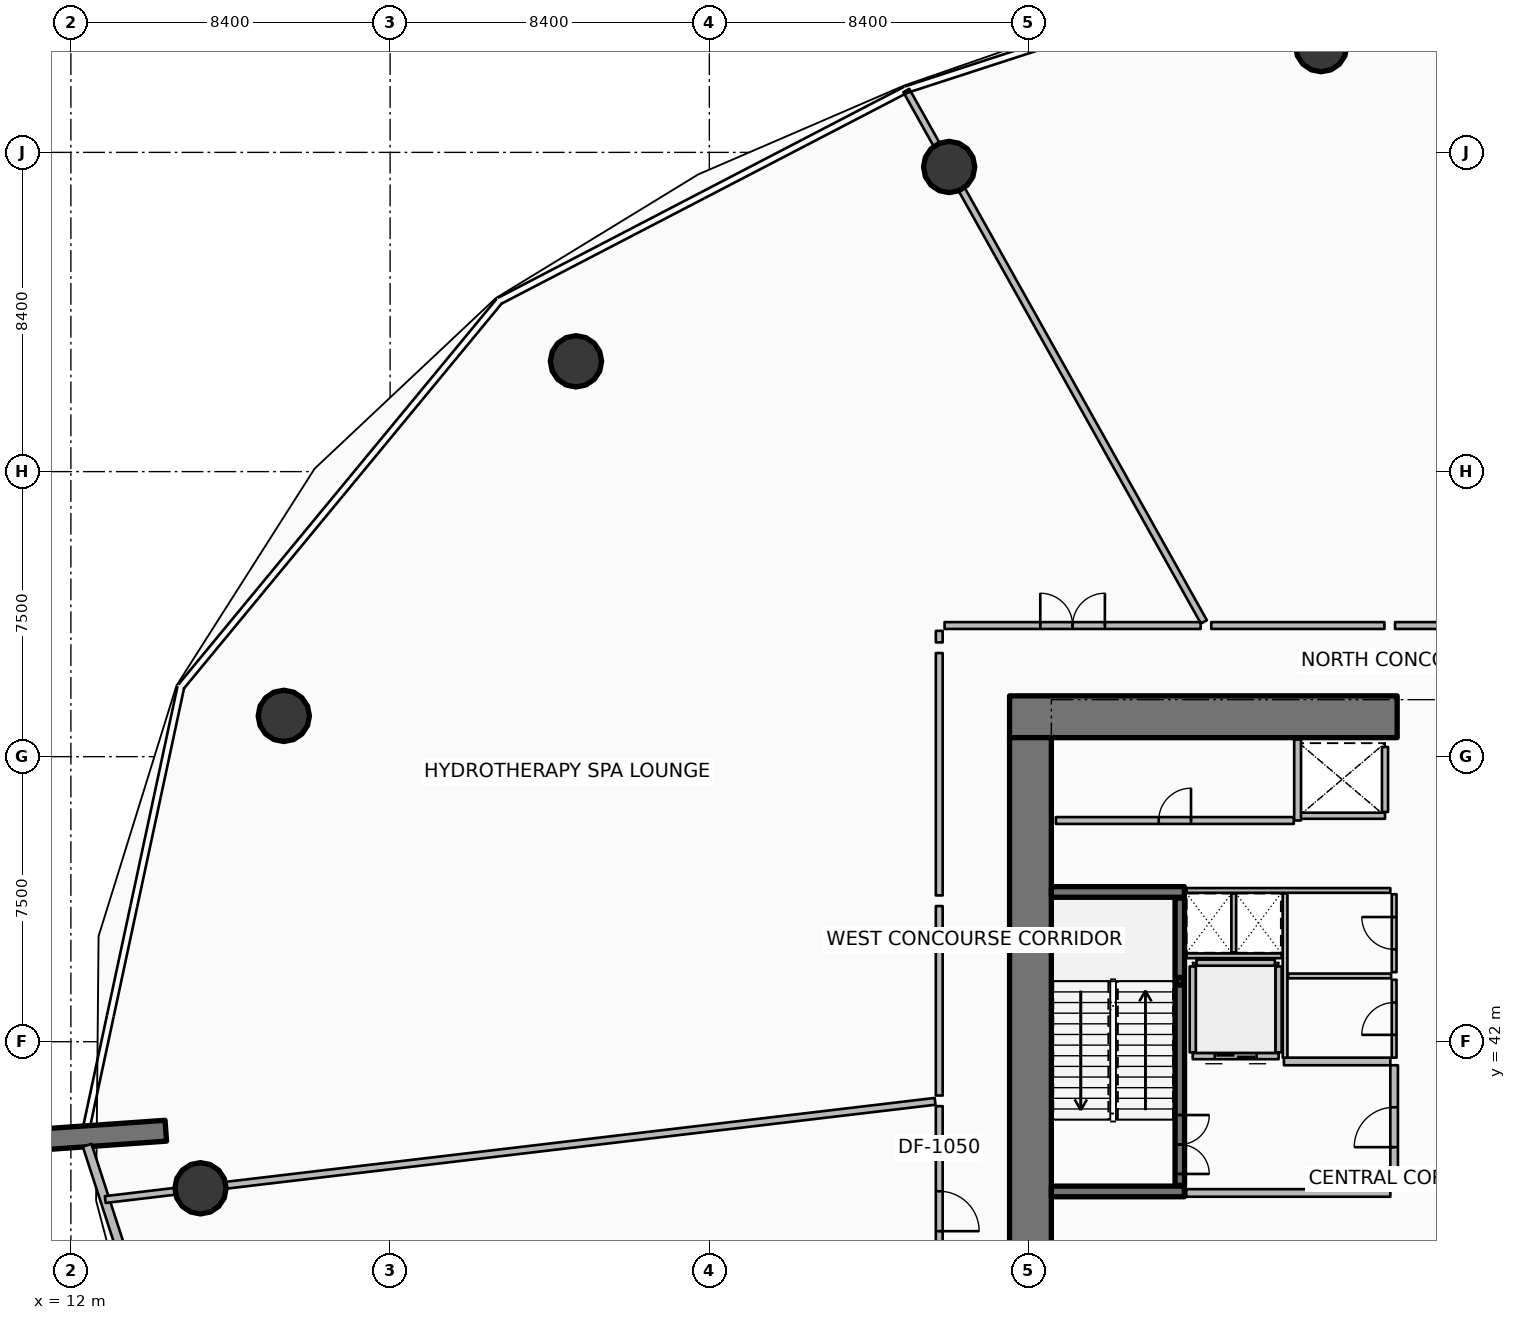
"""IFC4 building model, lengths in metres.
Left out: names, types, materials, properties, quantities, classifications, styles, units other than length and angle.
Written with IfcOpenShell. Run it as: python <this file> out.ifc"""

import sys

from ifc_helpers import new_model, si_unit, direction, frame, frame_2d, origin, origin_2d, place, context, subcontext, project, spatial, rectangle, hollow_rectangle, circle, extrude, element, fill, save


model = new_model("IFC4")
c1 = context("Model", 3, precision=1e-05, world=origin(), true_north=direction((0.0, 1.0)))
c2 = subcontext(c1, "Body", "Model", "MODEL_VIEW")
j1 = project(units=[si_unit("LENGTHUNIT", "METRE"), si_unit("PLANEANGLEUNIT", "RADIAN")], contexts=[c1])
p1 = place(None, origin())
s1 = spatial("IfcSite", under=j1, at=p1, CompositionType="ELEMENT")
p2 = place(p1, origin())
s2 = spatial("IfcBuilding", under=s1, at=p2, CompositionType="ELEMENT")
p3 = place(p2, frame((0.0, 0.0, 12.0)))
s3 = spatial("IfcBuildingStorey", under=s2, at=p3, CompositionType="ELEMENT", Elevation=12.0)
p4 = place(p3, frame((36.7, 50.55, 0.0), z_axis=(0.0, 0.0, 1.0), x_axis=(1.0, 0.0, 0.0)))
e1 = element("IfcWall", 1, at=p4, inside=s3, PredefinedType="SHEAR", context=c2, shape_type="SweptSolid", body=[
    extrude(rectangle(XDim=10.2, YDim=1.1, at=frame_2d((5.1, 0.0))), origin(), (0.0, 0.0, 1.0), 4.8),
])
p5 = place(p3, frame((37.25, 34.0, 0.0), z_axis=(0.0, 0.0, 1.0), x_axis=(0.0, 1.0, 0.0)))
e2 = element("IfcWall", 2, at=p5, inside=s3, PredefinedType="SHEAR", context=c2, shape_type="SweptSolid", body=[
    extrude(rectangle(XDim=16.0, YDim=1.1, at=frame_2d((8.0, 0.0))), origin(), (0.0, 0.0, 1.0), 4.8),
])
for number, where, z_axis, x_axis in (
    (3, (37.8, 38.06, 0.0), (0.0, 0.0, 1.0), (1.0, 0.0, 0.0)),
    (4, (37.8, 45.94, 0.0), (0.0, 0.0, 1.0), (1.0, 0.0, 0.0)),
):
    element("IfcWall", number, at=place(p3, frame(where, z_axis=z_axis, x_axis=x_axis)), inside=s3, PredefinedType="SHEAR", context=c2, shape_type="SweptSolid", body=[
        extrude(rectangle(XDim=3.5, YDim=0.28, at=frame_2d((1.75, 0.0))), origin(), (0.0, 0.0, 1.0), 4.8),
    ])
p6 = place(p3, frame((41.18, 43.59, 0.0), z_axis=(0.0, 0.0, 1.0), x_axis=(1.0, 0.0, 0.0)))
e5 = element("IfcColumn", 5, at=p6, inside=s3, PredefinedType="COLUMN", context=c2, shape_type="SweptSolid", body=[
    extrude(hollow_rectangle(XDim=0.2, YDim=0.2, WallThickness=0.01, InnerFilletRadius=0.01, OuterFilletRadius=0.02, at=origin_2d()), origin(), (0.0, 0.0, 1.0), 2.195),
])
p7 = place(p3, frame((14.497, 39.657, 0.0), z_axis=(0.0, 0.0, 1.0), x_axis=(-0.997564163539, -0.069754853754, 0.0)))
e6 = element("IfcWall", 6, at=p7, inside=s3, PredefinedType="SOLIDWALL", context=c2, shape_type="SweptSolid", body=[
    extrude(rectangle(XDim=3.5, YDim=0.55, at=frame_2d((1.75, 0.0))), origin(), (0.0, 0.0, 1.0), 4.8),
])
for number, where, z_axis, x_axis in (
    (7, (44.899, 68.196, 0.0), (0.0, 0.0, 1.0), (1.0, 0.0, 0.0)),
    (8, (35.111, 65.016, 0.0), (0.0, 0.0, 1.0), (1.0, 0.0, 0.0)),
    (9, (25.291, 59.902, 0.0), (0.0, 0.0, 1.0), (1.0, 0.0, 0.0)),
    (10, (17.602, 50.573, 0.0), (0.0, 0.0, 1.0), (1.0, 0.0, 0.0)),
    (11, (15.41, 38.143, 0.0), (0.0, 0.0, 1.0), (1.0, 0.0, 0.0)),
):
    element("IfcColumn", number, at=place(p3, frame(where, z_axis=z_axis, x_axis=x_axis)), inside=s3, PredefinedType="COLUMN", context=c2, shape_type="SweptSolid", body=[
        extrude(circle(Radius=0.675, at=origin_2d()), origin(), (0.0, 0.0, 1.0), 4.48),
    ])
p8 = place(p3, frame((12.427, 39.275, 0.0), z_axis=(0.0, 0.0, 1.0), x_axis=(0.309022005354, -0.951054888115, 0.0)))
e12 = element("IfcWall", 12, at=p8, inside=s3, PredefinedType="SOLIDWALL", context=c2, shape_type="SweptSolid", body=[
    extrude(rectangle(XDim=16.803, YDim=0.24, at=frame_2d((8.401, 0.0))), origin(), (0.0, 0.0, 1.0), 3.43),
])
p9 = place(p8, frame((7.201, 0.0, 0.85)))
e13 = element("IfcOpeningElement", 13, at=p9, cuts=e12, PredefinedType="OPENING", context=c2, shape_type="SweptSolid", body=[
    extrude(rectangle(XDim=2.4, YDim=2.1, at=frame_2d((1.2, 1.05))), frame((0.0, 0.13, 0.0), z_axis=(0.0, -1.0, 0.0), x_axis=(1.0, 0.0, 0.0)), (0.0, 0.0, 1.0), 0.26),
])
p10 = place(p3, frame((41.18, 38.22, 0.0), z_axis=(0.0, 0.0, 1.0), x_axis=(0.0, 1.0, 0.0)))
e14 = element("IfcWall", 14, at=p10, inside=s3, PredefinedType="SOLIDWALL", context=c2, shape_type="SweptSolid", body=[
    extrude(rectangle(XDim=7.56, YDim=0.25, at=frame_2d((3.78, 0.0))), origin(), (0.0, 0.0, 1.0), 4.48),
])
p11 = place(p10, frame((0.3, 0.0, 0.0)))
e15 = element("IfcOpeningElement", 15, at=p11, cuts=e14, PredefinedType="OPENING", context=c2, shape_type="SweptSolid", body=[
    extrude(rectangle(XDim=1.55, YDim=2.15, at=frame_2d((0.775, 1.075))), frame((0.0, 0.135, 0.0), z_axis=(0.0, -1.0, 0.0), x_axis=(1.0, 0.0, 0.0)), (0.0, 0.0, 1.0), 0.27),
])
p12 = place(p3, frame((46.58, 47.945, 0.0), z_axis=(0.0, 0.0, 1.0), x_axis=(-1.0, 0.0, 0.0)))
e16 = element("IfcWall", 16, at=p12, inside=s3, PredefinedType="PARTITIONING", context=c2, shape_type="SweptSolid", body=[
    extrude(rectangle(XDim=2.26, YDim=0.16, at=frame_2d((1.13, 0.0))), origin(), (0.0, 0.0, 1.0), 4.48),
])
p13 = place(p3, frame((46.58, 48.045, 0.0), z_axis=(0.0, 0.0, 1.0), x_axis=(0.0, 1.0, 0.0)))
e17 = element("IfcWall", 17, at=p13, inside=s3, PredefinedType="PARTITIONING", context=c2, shape_type="SweptSolid", body=[
    extrude(rectangle(XDim=1.71, YDim=0.16, at=frame_2d((0.855, 0.0))), origin(), (0.0, 0.0, 1.0), 4.48),
])
p14 = place(p3, frame((43.78, 41.62, 0.0), z_axis=(0.0, 0.0, 1.0), x_axis=(-1.0, 0.0, 0.0)))
e18 = element("IfcWall", 18, at=p14, inside=s3, PredefinedType="PARTITIONING", context=c2, shape_type="SweptSolid", body=[
    extrude(rectangle(XDim=2.26, YDim=0.16, at=frame_2d((1.13, 0.0))), origin(), (0.0, 0.0, 1.0), 4.48),
])
p15 = place(p14, frame((0.58, 0.0, 0.0)))
e19 = element("IfcOpeningElement", 19, at=p15, cuts=e18, PredefinedType="OPENING", context=c2, shape_type="SweptSolid", body=[
    extrude(rectangle(XDim=1.1, YDim=2.1, at=frame_2d((0.55, 1.05))), frame((0.0, 0.09, 0.0), z_axis=(0.0, -1.0, 0.0), x_axis=(1.0, 0.0, 0.0)), (0.0, 0.0, 1.0), 0.18),
])
for number, where, z_axis, x_axis in (
    (20, (43.78, 41.72, 0.0), (0.0, 0.0, 1.0), (0.0, 1.0, 0.0)),
    (21, (41.52, 41.72, 0.0), (0.0, 0.0, 1.0), (0.0, 1.0, 0.0)),
):
    element("IfcWall", number, at=place(p3, frame(where, z_axis=z_axis, x_axis=x_axis)), inside=s3, PredefinedType="PARTITIONING", context=c2, shape_type="SweptSolid", body=[
        extrude(rectangle(XDim=2.26, YDim=0.16, at=frame_2d((1.13, 0.0))), origin(), (0.0, 0.0, 1.0), 4.48),
    ])
p16 = place(p3, frame((41.62, 44.08, 0.0), z_axis=(0.0, 0.0, 1.0), x_axis=(1.0, 0.0, 0.0)))
e22 = element("IfcWall", 22, at=p16, inside=s3, PredefinedType="PARTITIONING", context=c2, shape_type="SweptSolid", body=[
    extrude(rectangle(XDim=2.06, YDim=0.16, at=frame_2d((1.03, 0.0))), origin(), (0.0, 0.0, 1.0), 4.48),
])
p17 = place(p3, frame((37.92, 47.82, 0.0), z_axis=(0.0, 0.0, 1.0), x_axis=(1.0, 0.0, 0.0)))
e23 = element("IfcWall", 23, at=p17, inside=s3, PredefinedType="PARTITIONING", context=c2, shape_type="SweptSolid", body=[
    extrude(rectangle(XDim=6.26, YDim=0.18, at=frame_2d((3.13, 0.0))), origin(), (0.0, 0.0, 1.0), 4.48),
])
p18 = place(p17, frame((2.705, 0.0, 0.0)))
e24 = element("IfcOpeningElement", 24, at=p18, cuts=e23, PredefinedType="OPENING", context=c2, shape_type="SweptSolid", body=[
    extrude(rectangle(XDim=0.85, YDim=2.06, at=frame_2d((0.425, 1.03))), frame((0.0, 0.1, 0.0), z_axis=(0.0, -1.0, 0.0), x_axis=(1.0, 0.0, 0.0)), (0.0, 0.0, 1.0), 0.2),
])
p19 = place(p3, frame((44.28, 47.82, 0.0), z_axis=(0.0, 0.0, 1.0), x_axis=(0.0, 1.0, 0.0)))
e25 = element("IfcWall", 25, at=p19, inside=s3, PredefinedType="PARTITIONING", context=c2, shape_type="SweptSolid", body=[
    extrude(rectangle(XDim=2.13, YDim=0.18, at=frame_2d((1.065, 0.0))), origin(), (0.0, 0.0, 1.0), 4.48),
])
p20 = place(p3, frame((41.35, 38.02, 0.0), z_axis=(0.0, 0.0, 1.0), x_axis=(1.0, 0.0, 0.0)))
e26 = element("IfcWall", 26, at=p20, inside=s3, PredefinedType="PARTITIONING", context=c2, shape_type="SweptSolid", body=[
    extrude(rectangle(XDim=5.37, YDim=0.2, at=frame_2d((2.685, 0.0))), origin(), (0.0, 0.0, 1.0), 4.48),
])
p21 = place(p3, frame((43.92, 41.48, 0.0), z_axis=(0.0, 0.0, 1.0), x_axis=(1.0, 0.0, 0.0)))
e27 = element("IfcWall", 27, at=p21, inside=s3, PredefinedType="PARTITIONING", context=c2, shape_type="SweptSolid", body=[
    extrude(rectangle(XDim=2.8, YDim=0.2, at=frame_2d((1.4, 0.0))), origin(), (0.0, 0.0, 1.0), 4.48),
])
p22 = place(p3, frame((46.82, 38.12, 0.0), z_axis=(0.0, 0.0, 1.0), x_axis=(0.0, 1.0, 0.0)))
e28 = element("IfcWall", 28, at=p22, inside=s3, PredefinedType="PARTITIONING", context=c2, shape_type="SweptSolid", body=[
    extrude(rectangle(XDim=3.26, YDim=0.2, at=frame_2d((1.63, 0.0))), origin(), (0.0, 0.0, 1.0), 4.48),
])
p23 = place(p22, frame((1.105, 0.0, 0.0)))
e29 = element("IfcOpeningElement", 29, at=p23, cuts=e28, PredefinedType="OPENING", context=c2, shape_type="SweptSolid", body=[
    extrude(rectangle(XDim=1.05, YDim=2.1, at=frame_2d((0.525, 1.05))), frame((0.0, 0.11, 0.0), z_axis=(0.0, -1.0, 0.0), x_axis=(1.0, 0.0, 0.0)), (0.0, 0.0, 1.0), 0.22),
])
p24 = place(p3, frame((41.36, 45.98, 0.0), z_axis=(0.0, 0.0, 1.0), x_axis=(1.0, 0.0, 0.0)))
e30 = element("IfcWall", 30, at=p24, inside=s3, PredefinedType="PARTITIONING", context=c2, shape_type="SweptSolid", body=[
    extrude(rectangle(XDim=5.36, YDim=0.125, at=frame_2d((2.68, 0.0))), origin(), (0.0, 0.0, 1.0), 3.92),
])
p25 = place(p3, frame((41.36, 44.26, 0.0), z_axis=(0.0, 0.0, 1.0), x_axis=(1.0, 0.0, 0.0)))
e31 = element("IfcWall", 31, at=p25, inside=s3, PredefinedType="PARTITIONING", context=c2, shape_type="SweptSolid", body=[
    extrude(rectangle(XDim=2.5, YDim=0.125, at=frame_2d((1.25, 0.0))), origin(), (0.0, 0.0, 1.0), 3.92),
])
p26 = place(p3, frame((42.6, 44.35, 0.0), z_axis=(0.0, 0.0, 1.0), x_axis=(0.0, 1.0, 0.0)))
e32 = element("IfcWall", 32, at=p26, inside=s3, PredefinedType="PARTITIONING", context=c2, shape_type="SweptSolid", body=[
    extrude(rectangle(XDim=1.55, YDim=0.125, at=frame_2d((0.775, 0.0))), origin(), (0.0, 0.0, 1.0), 3.92),
])
p27 = place(p3, frame((43.95, 41.58, 0.0), z_axis=(0.0, 0.0, 1.0), x_axis=(0.0, 1.0, 0.0)))
e33 = element("IfcWall", 33, at=p27, inside=s3, PredefinedType="PARTITIONING", context=c2, shape_type="SweptSolid", body=[
    extrude(rectangle(XDim=4.32, YDim=0.125, at=frame_2d((2.16, 0.0))), origin(), (0.0, 0.0, 1.0), 3.92),
])
p28 = place(p3, frame((44.03, 43.73, 0.0), z_axis=(0.0, 0.0, 1.0), x_axis=(1.0, 0.0, 0.0)))
e34 = element("IfcWall", 34, at=p28, inside=s3, PredefinedType="PARTITIONING", context=c2, shape_type="SweptSolid", body=[
    extrude(rectangle(XDim=2.71, YDim=0.125, at=frame_2d((1.355, 0.0))), origin(), (0.0, 0.0, 1.0), 3.92),
])
p29 = place(p3, frame((46.82, 41.58, 0.0), z_axis=(0.0, 0.0, 1.0), x_axis=(0.0, 1.0, 0.0)))
e35 = element("IfcWall", 35, at=p29, inside=s3, PredefinedType="PARTITIONING", context=c2, shape_type="SweptSolid", body=[
    extrude(rectangle(XDim=2.05, YDim=0.125, at=frame_2d((1.025, 0.0))), origin(), (0.0, 0.0, 1.0), 3.92),
])
p30 = place(p29, frame((0.6, 0.0, 0.0)))
e36 = element("IfcOpeningElement", 36, at=p30, cuts=e35, PredefinedType="OPENING", context=c2, shape_type="SweptSolid", body=[
    extrude(rectangle(XDim=0.85, YDim=2.06, at=frame_2d((0.425, 1.03))), frame((0.0, 0.073, 0.0), z_axis=(0.0, -1.0, 0.0), x_axis=(1.0, 0.0, 0.0)), (0.0, 0.0, 1.0), 0.145),
])
p31 = place(p3, frame((46.82, 43.83, 0.0), z_axis=(0.0, 0.0, 1.0), x_axis=(0.0, 1.0, 0.0)))
e37 = element("IfcWall", 37, at=p31, inside=s3, PredefinedType="PARTITIONING", context=c2, shape_type="SweptSolid", body=[
    extrude(rectangle(XDim=2.05, YDim=0.125, at=frame_2d((1.025, 0.0))), origin(), (0.0, 0.0, 1.0), 3.92),
])
p32 = place(p31, frame((0.6, 0.0, 0.0)))
e38 = element("IfcOpeningElement", 38, at=p32, cuts=e37, PredefinedType="OPENING", context=c2, shape_type="SweptSolid", body=[
    extrude(rectangle(XDim=0.85, YDim=2.06, at=frame_2d((0.425, 1.03))), frame((0.0, 0.073, 0.0), z_axis=(0.0, -1.0, 0.0), x_axis=(1.0, 0.0, 0.0)), (0.0, 0.0, 1.0), 0.145),
])
p33 = place(p3, frame((50.948, 52.95, 0.0), z_axis=(0.0, 0.0, 1.0), x_axis=(-1.0, 0.0, 0.0)))
e39 = element("IfcWall", 39, at=p33, inside=s3, PredefinedType="PARTITIONING", context=c2, shape_type="SweptSolid", body=[
    extrude(rectangle(XDim=4.104, YDim=0.18, at=frame_2d((2.052, 0.0))), origin(), (0.0, 0.0, 1.0), 3.693),
])
p34 = place(p3, frame((46.564, 52.95, 0.0), z_axis=(0.0, 0.0, 1.0), x_axis=(-1.0, 0.0, 0.0)))
e40 = element("IfcWall", 40, at=p34, inside=s3, PredefinedType="PARTITIONING", context=c2, shape_type="SweptSolid", body=[
    extrude(rectangle(XDim=4.556, YDim=0.18, at=frame_2d((2.278, 0.0))), origin(), (0.0, 0.0, 1.0), 3.693),
])
p35 = place(p3, frame((41.814, 53.046, 0.0), z_axis=(0.0, 0.0, 1.0), x_axis=(-0.48862053439, 0.872496403071, 0.0)))
e41 = element("IfcWall", 41, at=p35, inside=s3, PredefinedType="PARTITIONING", context=c2, shape_type="SweptSolid", body=[
    extrude(rectangle(XDim=16.024, YDim=0.18, at=frame_2d((8.012, 0.0))), origin(), (0.0, 0.0, 1.0), 3.693),
])
p36 = place(p3, frame((41.728, 52.95, 0.0), z_axis=(0.0, 0.0, 1.0), x_axis=(-1.0, 0.0, 0.0)))
e42 = element("IfcWall", 42, at=p36, inside=s3, PredefinedType="PARTITIONING", context=c2, shape_type="SweptSolid", body=[
    extrude(rectangle(XDim=6.738, YDim=0.18, at=frame_2d((3.369, 0.0))), origin(), (0.0, 0.0, 1.0), 3.693),
])
p37 = place(p36, frame((2.519, 0.0, 0.0)))
e43 = element("IfcOpeningElement", 43, at=p37, cuts=e42, PredefinedType="OPENING", context=c2, shape_type="SweptSolid", body=[
    extrude(rectangle(XDim=1.7, YDim=2.15, at=frame_2d((0.85, 1.075))), frame((0.0, 0.1, 0.0), z_axis=(0.0, -1.0, 0.0), x_axis=(1.0, 0.0, 0.0)), (0.0, 0.0, 1.0), 0.2),
])
p38 = place(p3, frame((34.85, 52.81, 0.0), z_axis=(0.0, 0.0, 1.0), x_axis=(0.0, -1.0, 0.0)))
e44 = element("IfcWall", 44, at=p38, inside=s3, PredefinedType="PARTITIONING", context=c2, shape_type="SweptSolid", body=[
    extrude(rectangle(XDim=0.303, YDim=0.18, at=frame_2d((0.152, 0.0))), origin(), (0.0, 0.0, 1.0), 3.693),
])
p39 = place(p3, frame((34.85, 52.227, 0.0), z_axis=(0.0, 0.0, 1.0), x_axis=(0.0, -1.0, 0.0)))
e45 = element("IfcWall", 45, at=p39, inside=s3, PredefinedType="PARTITIONING", context=c2, shape_type="SweptSolid", body=[
    extrude(rectangle(XDim=6.378, YDim=0.18, at=frame_2d((3.189, 0.0))), origin(), (0.0, 0.0, 1.0), 3.693),
])
p40 = place(p3, frame((34.85, 45.569, 0.0), z_axis=(0.0, 0.0, 1.0), x_axis=(0.0, -1.0, 0.0)))
e46 = element("IfcWall", 46, at=p40, inside=s3, PredefinedType="PARTITIONING", context=c2, shape_type="SweptSolid", body=[
    extrude(rectangle(XDim=4.985, YDim=0.18, at=frame_2d((2.493, 0.0))), origin(), (0.0, 0.0, 1.0), 3.693),
])
p41 = place(p3, frame((34.741, 40.431, 0.0), z_axis=(0.0, 0.0, 1.0), x_axis=(-0.993068662125, -0.117535663975, 0.0)))
e47 = element("IfcWall", 47, at=p41, inside=s3, PredefinedType="PARTITIONING", context=c2, shape_type="SweptSolid", body=[
    extrude(rectangle(XDim=21.989, YDim=0.18, at=frame_2d((10.994, 0.0))), origin(), (0.0, 0.0, 1.0), 3.693),
])
p42 = place(p3, frame((34.85, 40.304, 0.0), z_axis=(0.0, 0.0, 1.0), x_axis=(0.0, -1.0, 0.0)))
e48 = element("IfcWall", 48, at=p42, inside=s3, PredefinedType="PARTITIONING", context=c2, shape_type="SweptSolid", body=[
    extrude(rectangle(XDim=5.528, YDim=0.18, at=frame_2d((2.764, 0.0))), origin(), (0.0, 0.0, 1.0), 3.693),
])
p43 = place(p42, frame((2.239, 0.0, 0.0)))
e49 = element("IfcOpeningElement", 49, at=p43, cuts=e48, PredefinedType="OPENING", context=c2, shape_type="SweptSolid", body=[
    extrude(rectangle(XDim=1.05, YDim=2.1, at=frame_2d((0.525, 1.05))), frame((0.0, 0.1, 0.0), z_axis=(0.0, -1.0, 0.0), x_axis=(1.0, 0.0, 0.0)), (0.0, 0.0, 1.0), 0.2),
])
p44 = place(p11, origin())
e50 = element("IfcDoor", 50, at=p44, inside=s3, OperationType="DOUBLE_DOOR_SINGLE_SWING", PredefinedType="DOOR", context=c2, shape_type="SweptSolid", body=[
    extrude(rectangle(XDim=1.55, YDim=2.15, at=frame_2d((0.775, 1.075))), frame((0.0, 0.025, 0.0), z_axis=(0.0, -1.0, 0.0), x_axis=(1.0, 0.0, 0.0)), (0.0, 0.0, 1.0), 0.05),
])
fill(e15, e50)
p45 = place(p15, origin())
e51 = element("IfcDoor", 51, at=p45, inside=s3, OperationType="DOUBLE_DOOR_SLIDING", PredefinedType="DOOR", context=c2, shape_type="SweptSolid", body=[
    extrude(rectangle(XDim=1.1, YDim=2.1, at=frame_2d((0.55, 1.05))), frame((0.0, 0.025, 0.0), z_axis=(0.0, -1.0, 0.0), x_axis=(1.0, 0.0, 0.0)), (0.0, 0.0, 1.0), 0.05),
])
fill(e19, e51)
p46 = place(p18, origin())
e52 = element("IfcDoor", 52, at=p46, inside=s3, OperationType="SINGLE_SWING_RIGHT", PredefinedType="DOOR", context=c2, shape_type="SweptSolid", body=[
    extrude(rectangle(XDim=0.85, YDim=2.06, at=frame_2d((0.425, 1.03))), frame((0.0, 0.025, 0.0), z_axis=(0.0, -1.0, 0.0), x_axis=(1.0, 0.0, 0.0)), (0.0, 0.0, 1.0), 0.05),
])
fill(e24, e52)
p47 = place(p23, origin())
e53 = element("IfcDoor", 53, at=p47, inside=s3, OperationType="SINGLE_SWING_LEFT", PredefinedType="DOOR", context=c2, shape_type="SweptSolid", body=[
    extrude(rectangle(XDim=1.05, YDim=2.1, at=frame_2d((0.525, 1.05))), frame((0.0, 0.025, 0.0), z_axis=(0.0, -1.0, 0.0), x_axis=(1.0, 0.0, 0.0)), (0.0, 0.0, 1.0), 0.05),
])
fill(e29, e53)
p48 = place(p30, origin())
e54 = element("IfcDoor", 54, at=p48, inside=s3, OperationType="SINGLE_SWING_LEFT", PredefinedType="DOOR", context=c2, shape_type="SweptSolid", body=[
    extrude(rectangle(XDim=0.85, YDim=2.06, at=frame_2d((0.425, 1.03))), frame((0.0, 0.025, 0.0), z_axis=(0.0, -1.0, 0.0), x_axis=(1.0, 0.0, 0.0)), (0.0, 0.0, 1.0), 0.05),
])
fill(e36, e54)
p49 = place(p32, origin())
e55 = element("IfcDoor", 55, at=p49, inside=s3, OperationType="SINGLE_SWING_RIGHT", PredefinedType="DOOR", context=c2, shape_type="SweptSolid", body=[
    extrude(rectangle(XDim=0.85, YDim=2.06, at=frame_2d((0.425, 1.03))), frame((0.0, 0.025, 0.0), z_axis=(0.0, -1.0, 0.0), x_axis=(1.0, 0.0, 0.0)), (0.0, 0.0, 1.0), 0.05),
])
fill(e38, e55)
p50 = place(p37, origin())
e56 = element("IfcDoor", 56, at=p50, inside=s3, OperationType="DOUBLE_DOOR_SINGLE_SWING", PredefinedType="DOOR", context=c2, shape_type="SweptSolid", body=[
    extrude(rectangle(XDim=1.7, YDim=2.15, at=frame_2d((0.85, 1.075))), frame((0.0, 0.025, 0.0), z_axis=(0.0, -1.0, 0.0), x_axis=(1.0, 0.0, 0.0)), (0.0, 0.0, 1.0), 0.05),
])
fill(e43, e56)
p51 = place(p43, origin())
e57 = element("IfcDoor", 57, at=p51, inside=s3, OperationType="SINGLE_SWING_RIGHT", PredefinedType="DOOR", context=c2, shape_type="SweptSolid", body=[
    extrude(rectangle(XDim=1.05, YDim=2.1, at=frame_2d((0.525, 1.05))), frame((0.0, 0.025, 0.0), z_axis=(0.0, -1.0, 0.0), x_axis=(1.0, 0.0, 0.0)), (0.0, 0.0, 1.0), 0.05),
])
fill(e49, e57)
save(model, sys.argv[1])
